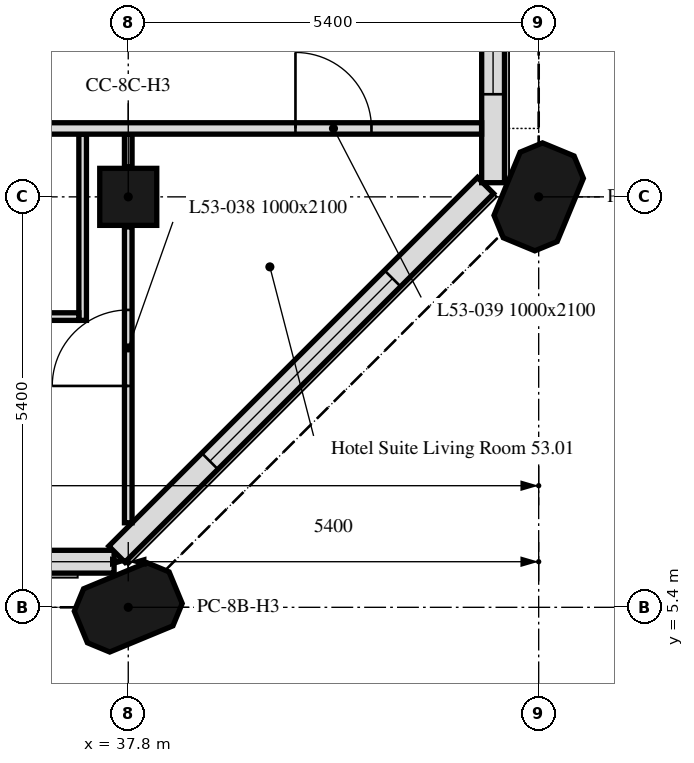
"""IFC4 building model, lengths in metres.
Left out: names, types, materials, properties, quantities, classifications, styles, units other than length and angle.
Written with IfcOpenShell. Run it as: python <this file> out.ifc"""

import sys

from ifc_helpers import new_model, si_unit, direction, frame, frame_2d, origin, origin_2d, place, context, subcontext, project, spatial, polyline, rectangle, outline, extrude, element, fill, save


model = new_model("IFC4")
c1 = context("Model", 3, precision=1e-05, world=origin(), true_north=direction((0.0, 1.0)))
c2 = subcontext(c1, "Body", "Model", "MODEL_VIEW")
j1 = project(units=[si_unit("LENGTHUNIT", "METRE"), si_unit("PLANEANGLEUNIT", "RADIAN")], contexts=[c1])
p1 = place(None, origin())
s1 = spatial("IfcSite", under=j1, at=p1, CompositionType="ELEMENT")
p2 = place(p1, origin())
s2 = spatial("IfcBuilding", under=s1, at=p2, CompositionType="ELEMENT")
p3 = place(p2, frame((0.0, 0.0, 213.7)))
s3 = spatial("IfcBuildingStorey", under=s2, at=p3, CompositionType="ELEMENT", Elevation=213.7)
p4 = place(p3, frame((37.8, 5.4, 0.0), z_axis=(0.0, 0.0, 1.0), x_axis=(0.923879532511, 0.382683432365, 0.0)))
e1 = element("IfcColumn", 1, at=p4, inside=s3, PredefinedType="COLUMN", context=c2, shape_type="SweptSolid", body=[
    extrude(outline(polyline([(-0.45, -0.45), (0.45, -0.45), (0.675, -0.225), (0.675, 0.225), (0.45, 0.45), (-0.45, 0.45), (-0.675, 0.225), (-0.675, -0.225), (-0.45, -0.45)])), origin(), (0.0, 0.0, 1.0), 3.0),
])
p5 = place(p3, frame((37.8, 10.8, 0.0), z_axis=(0.0, 0.0, 1.0), x_axis=(1.0, 0.0, 0.0)))
e2 = element("IfcColumn", 2, at=p5, inside=s3, PredefinedType="COLUMN", context=c2, shape_type="SweptSolid", body=[
    extrude(rectangle(XDim=0.75, YDim=0.75, at=origin_2d()), origin(), (0.0, 0.0, 1.0), 3.0),
])
p6 = place(p3, frame((43.2, 10.8, 0.0), z_axis=(0.0, 0.0, 1.0), x_axis=(0.382683432365, 0.923879532511, 0.0)))
e3 = element("IfcColumn", 3, at=p6, inside=s3, PredefinedType="COLUMN", context=c2, shape_type="SweptSolid", body=[
    extrude(outline(polyline([(-0.45, -0.45), (0.45, -0.45), (0.675, -0.225), (0.675, 0.225), (0.45, 0.45), (-0.45, 0.45), (-0.675, 0.225), (-0.675, -0.225), (-0.45, -0.45)])), origin(), (0.0, 0.0, 1.0), 3.0),
])
p7 = place(p3, frame((5.586, 6.0, 0.0), z_axis=(0.0, 0.0, 1.0), x_axis=(1.0, 0.0, 0.0)))
e4 = element("IfcWall", 4, at=p7, inside=s3, PredefinedType="SOLIDWALL", context=c2, shape_type="SweptSolid", body=[
    extrude(rectangle(XDim=32.027, YDim=0.3, at=frame_2d((16.014, 0.0))), origin(), (0.0, 0.0, 1.0), 3.0),
])
p8 = place(p7, frame((0.814, 0.0, 0.9)))
e5 = element("IfcOpeningElement", 5, at=p8, cuts=e4, PredefinedType="OPENING", context=c2, shape_type="SweptSolid", body=[
    extrude(rectangle(XDim=3.4, YDim=1.7, at=frame_2d((1.7, 0.85))), frame((0.0, 0.16, 0.0), z_axis=(0.0, -1.0, 0.0), x_axis=(1.0, 0.0, 0.0)), (0.0, 0.0, 1.0), 0.32),
])
p9 = place(p7, frame((6.564, 0.0, 0.9)))
e6 = element("IfcOpeningElement", 6, at=p9, cuts=e4, PredefinedType="OPENING", context=c2, shape_type="SweptSolid", body=[
    extrude(rectangle(XDim=1.1, YDim=1.7, at=frame_2d((0.55, 0.85))), frame((0.0, 0.16, 0.0), z_axis=(0.0, -1.0, 0.0), x_axis=(1.0, 0.0, 0.0)), (0.0, 0.0, 1.0), 0.32),
])
p10 = place(p7, frame((11.614, 0.0, 0.9)))
e7 = element("IfcOpeningElement", 7, at=p10, cuts=e4, PredefinedType="OPENING", context=c2, shape_type="SweptSolid", body=[
    extrude(rectangle(XDim=3.4, YDim=1.7, at=frame_2d((1.7, 0.85))), frame((0.0, 0.16, 0.0), z_axis=(0.0, -1.0, 0.0), x_axis=(1.0, 0.0, 0.0)), (0.0, 0.0, 1.0), 0.32),
])
p11 = place(p7, frame((17.364, 0.0, 0.9)))
e8 = element("IfcOpeningElement", 8, at=p11, cuts=e4, PredefinedType="OPENING", context=c2, shape_type="SweptSolid", body=[
    extrude(rectangle(XDim=1.1, YDim=1.7, at=frame_2d((0.55, 0.85))), frame((0.0, 0.16, 0.0), z_axis=(0.0, -1.0, 0.0), x_axis=(1.0, 0.0, 0.0)), (0.0, 0.0, 1.0), 0.32),
])
p12 = place(p7, frame((22.414, 0.0, 0.9)))
e9 = element("IfcOpeningElement", 9, at=p12, cuts=e4, PredefinedType="OPENING", context=c2, shape_type="SweptSolid", body=[
    extrude(rectangle(XDim=3.4, YDim=1.7, at=frame_2d((1.7, 0.85))), frame((0.0, 0.16, 0.0), z_axis=(0.0, -1.0, 0.0), x_axis=(1.0, 0.0, 0.0)), (0.0, 0.0, 1.0), 0.32),
])
p13 = place(p7, frame((28.164, 0.0, 0.9)))
e10 = element("IfcOpeningElement", 10, at=p13, cuts=e4, PredefinedType="OPENING", context=c2, shape_type="SweptSolid", body=[
    extrude(rectangle(XDim=1.1, YDim=1.7, at=frame_2d((0.55, 0.85))), frame((0.0, 0.16, 0.0), z_axis=(0.0, -1.0, 0.0), x_axis=(1.0, 0.0, 0.0)), (0.0, 0.0, 1.0), 0.32),
])
p14 = place(p3, frame((37.65, 6.099, 0.0), z_axis=(0.0, 0.0, 1.0), x_axis=(0.707106781187, 0.707106781187, 0.0)))
e11 = element("IfcWall", 11, at=p14, inside=s3, PredefinedType="SOLIDWALL", context=c2, shape_type="SweptSolid", body=[
    extrude(rectangle(XDim=6.86, YDim=0.3, at=frame_2d((3.43, 0.0))), origin(), (0.0, 0.0, 1.0), 3.0),
])
p15 = place(p14, frame((1.73, 0.0, 0.9)))
e12 = element("IfcOpeningElement", 12, at=p15, cuts=e11, PredefinedType="OPENING", context=c2, shape_type="SweptSolid", body=[
    extrude(rectangle(XDim=3.4, YDim=1.7, at=frame_2d((1.7, 0.85))), frame((0.0, 0.16, 0.0), z_axis=(0.0, -1.0, 0.0), x_axis=(1.0, 0.0, 0.0)), (0.0, 0.0, 1.0), 0.32),
])
p16 = place(p3, frame((42.6, 10.986, 0.0), z_axis=(0.0, 0.0, 1.0), x_axis=(0.0, 1.0, 0.0)))
e13 = element("IfcWall", 13, at=p16, inside=s3, PredefinedType="SOLIDWALL", context=c2, shape_type="SweptSolid", body=[
    extrude(rectangle(XDim=5.214, YDim=0.3, at=frame_2d((2.607, 0.0))), origin(), (0.0, 0.0, 1.0), 3.0),
])
p17 = place(p16, frame((1.164, 0.0, 0.9)))
e14 = element("IfcOpeningElement", 14, at=p17, cuts=e13, PredefinedType="OPENING", context=c2, shape_type="SweptSolid", body=[
    extrude(rectangle(XDim=1.1, YDim=1.7, at=frame_2d((0.55, 0.85))), frame((0.0, 0.16, 0.0), z_axis=(0.0, -1.0, 0.0), x_axis=(1.0, 0.0, 0.0)), (0.0, 0.0, 1.0), 0.32),
])
p18 = place(p16, frame((2.764, 0.0, 0.9)))
e15 = element("IfcOpeningElement", 15, at=p18, cuts=e13, PredefinedType="OPENING", context=c2, shape_type="SweptSolid", body=[
    extrude(rectangle(XDim=1.1, YDim=1.7, at=frame_2d((0.55, 0.85))), frame((0.0, 0.16, 0.0), z_axis=(0.0, -1.0, 0.0), x_axis=(1.0, 0.0, 0.0)), (0.0, 0.0, 1.0), 0.32),
])
p19 = place(p3, frame((37.8, 6.512, 0.0), z_axis=(0.0, 0.0, 1.0), x_axis=(0.0, 1.0, 0.0)))
e16 = element("IfcWall", 16, at=p19, inside=s3, PredefinedType="PARTITIONING", context=c2, shape_type="SweptSolid", body=[
    extrude(rectangle(XDim=3.893, YDim=0.1, at=frame_2d((1.946, 0.0))), origin(), (0.0, 0.0, 1.0), 3.0),
])
p20 = place(p19, frame((1.8, 0.0, 0.0)))
e17 = element("IfcOpeningElement", 17, at=p20, cuts=e16, PredefinedType="OPENING", context=c2, shape_type="SweptSolid", body=[
    extrude(rectangle(XDim=1.0, YDim=2.1, at=frame_2d((0.5, 1.05))), frame((0.0, 0.05, 0.0), z_axis=(0.0, -1.0, 0.0), x_axis=(1.0, 0.0, 0.0)), (0.0, 0.0, 1.0), 0.1),
])
p21 = place(p3, frame((37.8, 11.195, 0.0), z_axis=(0.0, 0.0, 1.0), x_axis=(0.0, 1.0, 0.0)))
e18 = element("IfcWall", 18, at=p21, inside=s3, PredefinedType="PARTITIONING", context=c2, shape_type="SweptSolid", body=[
    extrude(rectangle(XDim=0.43, YDim=0.1, at=frame_2d((0.215, 0.0))), origin(), (0.0, 0.0, 1.0), 3.0),
])
p22 = place(p3, frame((37.2, 11.625, 0.0), z_axis=(0.0, 0.0, 1.0), x_axis=(0.0, -1.0, 0.0)))
e19 = element("IfcWall", 19, at=p22, inside=s3, PredefinedType="PARTITIONING", context=c2, shape_type="SweptSolid", body=[
    extrude(rectangle(XDim=2.45, YDim=0.1, at=frame_2d((1.225, 0.0))), origin(), (0.0, 0.0, 1.0), 3.0),
])
p23 = place(p3, frame((37.15, 9.225, 0.0), z_axis=(0.0, 0.0, 1.0), x_axis=(-1.0, 0.0, 0.0)))
e20 = element("IfcWall", 20, at=p23, inside=s3, PredefinedType="PARTITIONING", context=c2, shape_type="SweptSolid", body=[
    extrude(rectangle(XDim=2.4, YDim=0.1, at=frame_2d((1.2, 0.0))), origin(), (0.0, 0.0, 1.0), 3.0),
])
p24 = place(p23, frame((1.1, 0.0, 0.0)))
e21 = element("IfcOpeningElement", 21, at=p24, cuts=e20, PredefinedType="OPENING", context=c2, shape_type="SweptSolid", body=[
    extrude(rectangle(XDim=0.9, YDim=2.1, at=frame_2d((0.45, 1.05))), frame((0.0, 0.05, 0.0), z_axis=(0.0, -1.0, 0.0), x_axis=(1.0, 0.0, 0.0)), (0.0, 0.0, 1.0), 0.1),
])
p25 = place(p3, frame((0.751, 11.7, 0.0), z_axis=(0.0, 0.0, 1.0), x_axis=(1.0, 0.0, 0.0)))
e22 = element("IfcWall", 22, at=p25, inside=s3, PredefinedType="PARTITIONING", context=c2, shape_type="SweptSolid", body=[
    extrude(rectangle(XDim=41.698, YDim=0.15, at=frame_2d((20.849, 0.0))), origin(), (0.0, 0.0, 1.0), 3.0),
])
p26 = place(p25, frame((39.249, 0.0, 0.0)))
e23 = element("IfcOpeningElement", 23, at=p26, cuts=e22, PredefinedType="OPENING", context=c2, shape_type="SweptSolid", body=[
    extrude(rectangle(XDim=1.0, YDim=2.1, at=frame_2d((0.5, 1.05))), frame((0.0, 0.075, 0.0), z_axis=(0.0, -1.0, 0.0), x_axis=(1.0, 0.0, 0.0)), (0.0, 0.0, 1.0), 0.15),
])
p27 = place(p25, frame((27.649, 0.0, 0.0)))
e24 = element("IfcOpeningElement", 24, at=p27, cuts=e22, PredefinedType="OPENING", context=c2, shape_type="SweptSolid", body=[
    extrude(rectangle(XDim=1.0, YDim=2.1, at=frame_2d((0.5, 1.05))), frame((0.0, 0.075, 0.0), z_axis=(0.0, -1.0, 0.0), x_axis=(1.0, 0.0, 0.0)), (0.0, 0.0, 1.0), 0.15),
])
p28 = place(p25, frame((22.249, 0.0, 0.0)))
e25 = element("IfcOpeningElement", 25, at=p28, cuts=e22, PredefinedType="OPENING", context=c2, shape_type="SweptSolid", body=[
    extrude(rectangle(XDim=1.0, YDim=2.1, at=frame_2d((0.5, 1.05))), frame((0.0, 0.075, 0.0), z_axis=(0.0, -1.0, 0.0), x_axis=(1.0, 0.0, 0.0)), (0.0, 0.0, 1.0), 0.15),
])
p29 = place(p25, frame((16.849, 0.0, 0.0)))
e26 = element("IfcOpeningElement", 26, at=p29, cuts=e22, PredefinedType="OPENING", context=c2, shape_type="SweptSolid", body=[
    extrude(rectangle(XDim=1.0, YDim=2.1, at=frame_2d((0.5, 1.05))), frame((0.0, 0.075, 0.0), z_axis=(0.0, -1.0, 0.0), x_axis=(1.0, 0.0, 0.0)), (0.0, 0.0, 1.0), 0.15),
])
p30 = place(p25, frame((11.449, 0.0, 0.0)))
e27 = element("IfcOpeningElement", 27, at=p30, cuts=e22, PredefinedType="OPENING", context=c2, shape_type="SweptSolid", body=[
    extrude(rectangle(XDim=1.0, YDim=2.1, at=frame_2d((0.5, 1.05))), frame((0.0, 0.075, 0.0), z_axis=(0.0, -1.0, 0.0), x_axis=(1.0, 0.0, 0.0)), (0.0, 0.0, 1.0), 0.15),
])
p31 = place(p25, frame((2.744, 0.0, 0.0)))
e28 = element("IfcOpeningElement", 28, at=p31, cuts=e22, PredefinedType="OPENING", context=c2, shape_type="SweptSolid", body=[
    extrude(rectangle(XDim=1.0, YDim=2.1, at=frame_2d((0.5, 1.05))), frame((0.0, 0.075, 0.0), z_axis=(0.0, -1.0, 0.0), x_axis=(1.0, 0.0, 0.0)), (0.0, 0.0, 1.0), 0.15),
])
p32 = place(p15, origin())
e29 = element("IfcWindow", 29, at=p32, inside=s3, PartitioningType="SINGLE_PANEL", PredefinedType="WINDOW", context=c2, shape_type="SweptSolid", body=[
    extrude(rectangle(XDim=3.4, YDim=1.7, at=frame_2d((1.7, 0.85))), frame((0.0, 0.03, 0.0), z_axis=(0.0, -1.0, 0.0), x_axis=(1.0, 0.0, 0.0)), (0.0, 0.0, 1.0), 0.06),
])
fill(e12, e29)
p33 = place(p17, origin())
e30 = element("IfcWindow", 30, at=p33, inside=s3, PartitioningType="SINGLE_PANEL", PredefinedType="WINDOW", context=c2, shape_type="SweptSolid", body=[
    extrude(rectangle(XDim=1.1, YDim=1.7, at=frame_2d((0.55, 0.85))), frame((0.0, 0.03, 0.0), z_axis=(0.0, -1.0, 0.0), x_axis=(1.0, 0.0, 0.0)), (0.0, 0.0, 1.0), 0.06),
])
fill(e14, e30)
p34 = place(p20, origin())
e31 = element("IfcDoor", 31, at=p34, inside=s3, OperationType="SINGLE_SWING_RIGHT", PredefinedType="DOOR", context=c2, shape_type="SweptSolid", body=[
    extrude(rectangle(XDim=1.0, YDim=2.1, at=frame_2d((0.5, 1.05))), frame((0.0, 0.025, 0.0), z_axis=(0.0, -1.0, 0.0), x_axis=(1.0, 0.0, 0.0)), (0.0, 0.0, 1.0), 0.05),
])
fill(e17, e31)
p35 = place(p26, origin())
e32 = element("IfcDoor", 32, at=p35, inside=s3, OperationType="SINGLE_SWING_LEFT", PredefinedType="DOOR", context=c2, shape_type="SweptSolid", body=[
    extrude(rectangle(XDim=1.0, YDim=2.1, at=frame_2d((0.5, 1.05))), frame((0.0, 0.025, 0.0), z_axis=(0.0, -1.0, 0.0), x_axis=(1.0, 0.0, 0.0)), (0.0, 0.0, 1.0), 0.05),
])
fill(e23, e32)
save(model, sys.argv[1])
